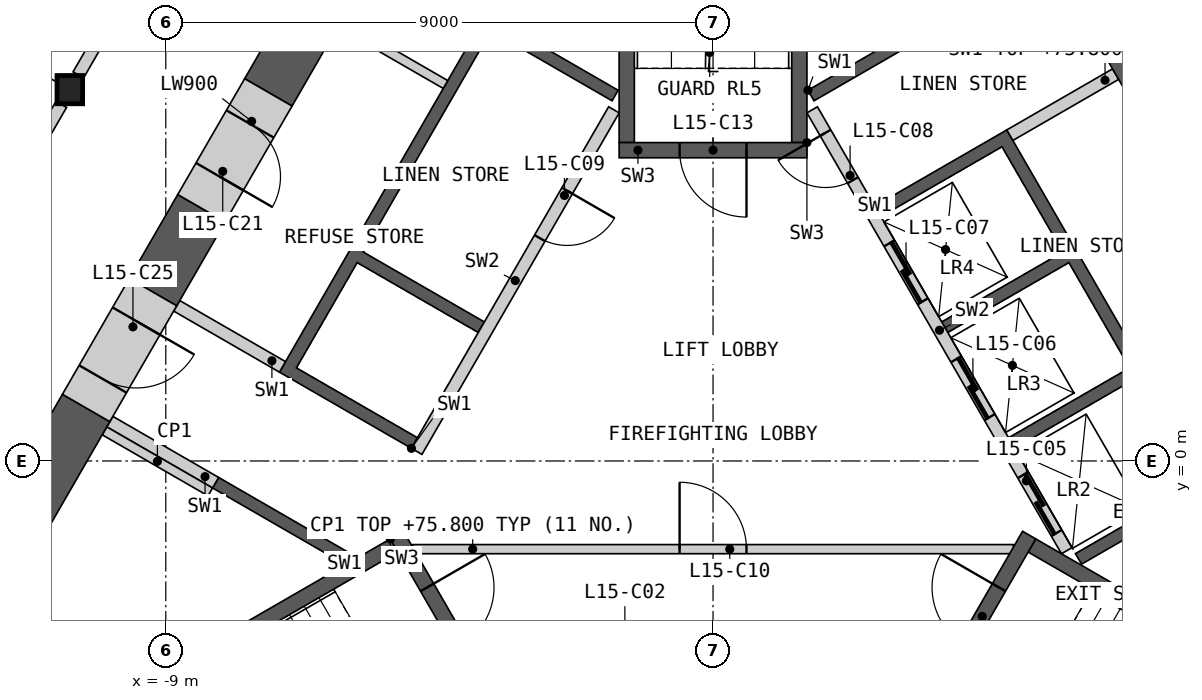
"""IFC4 building model, lengths in metres.
Left out: names, types, materials, properties, quantities, classifications, styles, units other than length and angle.
Written with IfcOpenShell. Run it as: python <this file> out.ifc"""

import sys

from ifc_helpers import new_model, si_unit, direction, frame, frame_2d, origin, origin_2d, place, context, subcontext, project, spatial, polyline, rectangle, i_section, outline, extrude, element, fill, save


model = new_model("IFC4")
c1 = context("Model", 3, precision=1e-05, world=origin(), true_north=direction((0.0, 1.0)))
c2 = subcontext(c1, "Body", "Model", "MODEL_VIEW")
j1 = project(units=[si_unit("LENGTHUNIT", "METRE"), si_unit("PLANEANGLEUNIT", "RADIAN")], contexts=[c1])
p1 = place(None, origin())
s1 = spatial("IfcSite", under=j1, at=p1, CompositionType="ELEMENT")
p2 = place(p1, origin())
s2 = spatial("IfcBuilding", under=s1, at=p2, CompositionType="ELEMENT")
p3 = place(p2, frame((0.0, 0.0, 72.0)))
s3 = spatial("IfcBuildingStorey", under=s2, at=p3, CompositionType="ELEMENT", Elevation=72.0)
p4 = place(p3, frame((-10.578, 6.107, 0.0), z_axis=(0.0, 0.0, 1.0), x_axis=(1.0, 0.0, 0.0)))
e1 = element("IfcColumn", 1, at=p4, inside=s3, PredefinedType="COLUMN", context=c2, shape_type="SweptSolid", body=[
    extrude(i_section(OverallWidth=0.421, OverallDepth=0.465, WebThickness=0.045, FlangeThickness=0.072, at=origin_2d()), origin(), (0.0, 0.0, 1.0), 4.2),
])
p5 = place(p3, origin())
e2 = element("IfcWall", 2, at=p5, inside=s3, PredefinedType="SHEAR", context=c2, shape_type="SweptSolid", body=[
    extrude(outline(polyline([(1.561, 6.097), (3.731, 7.35), (3.831, 7.177), (1.66, 5.924), (1.561, 6.097)])), origin(), (0.0, 0.0, 1.0), 3.8),
])
p6 = place(p3, origin())
e3 = element("IfcWall", 3, at=p6, inside=s3, PredefinedType="SHEAR", context=c2, shape_type="SweptSolid", body=[
    extrude(outline(polyline([(2.66, 4.192), (4.831, 5.445), (8.231, -0.444), (6.061, -1.697), (5.96, -1.524), (7.952, -0.374), (6.952, 1.358), (4.96, 0.208), (4.861, 0.381), (6.852, 1.531), (5.852, 3.263), (3.861, 2.113), (3.76, 2.287), (5.752, 3.437), (4.752, 5.169), (2.76, 4.019), (2.66, 4.192)])), origin(), (0.0, 0.0, 1.0), 3.8),
])
p7 = place(p3, frame((5.817, -1.476, 0.0), z_axis=(0.0, 0.0, 1.0), x_axis=(-0.500002616675, 0.866023893041, 0.0)))
e4 = element("IfcWall", 4, at=p7, inside=s3, PredefinedType="SOLIDWALL", context=c2, shape_type="SweptSolid", body=[
    extrude(rectangle(XDim=8.373, YDim=0.2, at=frame_2d((4.187, 0.0))), origin(), (0.0, 0.0, 1.0), 3.8),
])
p8 = place(p7, frame((0.337, 0.0, 0.0)))
e5 = element("IfcOpeningElement", 5, at=p8, cuts=e4, PredefinedType="OPENING", context=c2, shape_type="SweptSolid", body=[
    extrude(rectangle(XDim=1.1, YDim=2.1, at=frame_2d((0.55, 1.05))), frame((0.0, 0.11, 0.0), z_axis=(0.0, -1.0, 0.0), x_axis=(1.0, 0.0, 0.0)), (0.0, 0.0, 1.0), 0.22),
])
p9 = place(p7, frame((2.537, 0.0, 0.0)))
e6 = element("IfcOpeningElement", 6, at=p9, cuts=e4, PredefinedType="OPENING", context=c2, shape_type="SweptSolid", body=[
    extrude(rectangle(XDim=1.1, YDim=2.1, at=frame_2d((0.55, 1.05))), frame((0.0, 0.11, 0.0), z_axis=(0.0, -1.0, 0.0), x_axis=(1.0, 0.0, 0.0)), (0.0, 0.0, 1.0), 0.22),
])
p10 = place(p7, frame((4.737, 0.0, 0.0)))
e7 = element("IfcOpeningElement", 7, at=p10, cuts=e4, PredefinedType="OPENING", context=c2, shape_type="SweptSolid", body=[
    extrude(rectangle(XDim=1.1, YDim=2.1, at=frame_2d((0.55, 1.05))), frame((0.0, 0.11, 0.0), z_axis=(0.0, -1.0, 0.0), x_axis=(1.0, 0.0, 0.0)), (0.0, 0.0, 1.0), 0.22),
])
p11 = place(p7, frame((7.037, 0.0, 0.0)))
e8 = element("IfcOpeningElement", 8, at=p11, cuts=e4, PredefinedType="OPENING", context=c2, shape_type="SweptSolid", body=[
    extrude(rectangle(XDim=0.9, YDim=2.1, at=frame_2d((0.45, 1.05))), frame((0.0, 0.11, 0.0), z_axis=(0.0, -1.0, 0.0), x_axis=(1.0, 0.0, 0.0)), (0.0, 0.0, 1.0), 0.22),
])
p12 = place(p3, frame((4.881, 5.358, 0.0), z_axis=(0.0, 0.0, 1.0), x_axis=(0.866035824272, 0.499981950752, 0.0)))
e9 = element("IfcWall", 9, at=p12, inside=s3, PredefinedType="SHEAR", context=c2, shape_type="SweptSolid", body=[
    extrude(rectangle(XDim=2.009, YDim=0.2, at=frame_2d((1.004, 0.0))), origin(), (0.0, 0.0, 1.0), 3.8),
])
p13 = place(p3, origin())
e10 = element("IfcWall", 10, at=p13, inside=s3, PredefinedType="SHEAR", context=c2, shape_type="SweptSolid", body=[
    extrude(outline(polyline([(-6.061, -1.697), (-8.231, -0.444), (-8.131, -0.271), (-5.96, -1.524), (-6.061, -1.697)])), origin(), (0.0, 0.0, 1.0), 3.8),
])
p14 = place(p3, origin())
e11 = element("IfcWall", 11, at=p14, inside=s3, PredefinedType="SHEAR", context=c2, shape_type="SweptSolid", body=[
    extrude(outline(polyline([(-4.96, 0.208), (-7.131, 1.461), (-3.731, 7.35), (-1.561, 6.097), (-1.66, 5.924), (-3.652, 7.074), (-5.752, 3.437), (-3.76, 2.287), (-3.861, 2.113), (-5.852, 3.263), (-6.852, 1.531), (-4.861, 0.381), (-4.96, 0.208)])), origin(), (0.0, 0.0, 1.0), 3.8),
])
p15 = place(p3, frame((-1.631, 5.776, 0.0), z_axis=(0.0, 0.0, 1.0), x_axis=(-0.499992876559, -0.866029516466, 0.0)))
e12 = element("IfcWall", 12, at=p15, inside=s3, PredefinedType="SOLIDWALL", context=c2, shape_type="SweptSolid", body=[
    extrude(rectangle(XDim=6.486, YDim=0.2, at=frame_2d((3.243, 0.0))), origin(), (0.0, 0.0, 1.0), 3.8),
])
p16 = place(p15, frame((1.537, 0.0, 0.0)))
e13 = element("IfcOpeningElement", 13, at=p16, cuts=e12, PredefinedType="OPENING", context=c2, shape_type="SweptSolid", body=[
    extrude(rectangle(XDim=0.9, YDim=2.1, at=frame_2d((0.45, 1.05))), frame((0.0, 0.11, 0.0), z_axis=(0.0, -1.0, 0.0), x_axis=(1.0, 0.0, 0.0)), (0.0, 0.0, 1.0), 0.22),
])
p17 = place(p3, frame((-7.081, 1.548, 0.0), z_axis=(0.0, 0.0, 1.0), x_axis=(-0.865983199114, 0.50007309351, 0.0)))
e14 = element("IfcWall", 14, at=p17, inside=s3, PredefinedType="SHEAR", context=c2, shape_type="SweptSolid", body=[
    extrude(rectangle(XDim=2.009, YDim=0.2, at=frame_2d((1.004, 0.0))), origin(), (0.0, 0.0, 1.0), 3.8),
])
p18 = place(p3, frame((-8.181, -0.357, 0.0), z_axis=(0.0, 0.0, 1.0), x_axis=(-0.866035824272, 0.499981950752, 0.0)))
e15 = element("IfcWall", 15, at=p18, inside=s3, PredefinedType="SHEAR", context=c2, shape_type="SweptSolid", body=[
    extrude(rectangle(XDim=2.009, YDim=0.2, at=frame_2d((1.004, 0.0))), origin(), (0.0, 0.0, 1.0), 3.8),
])
p19 = place(p3, frame((-4.941, -1.45, 0.0), z_axis=(0.0, 0.0, 1.0), x_axis=(1.0, 0.0, 0.0)))
e16 = element("IfcWall", 16, at=p19, inside=s3, PredefinedType="PARTITIONING", context=c2, shape_type="SweptSolid", body=[
    extrude(rectangle(XDim=9.882, YDim=0.15, at=frame_2d((4.941, 0.0))), origin(), (0.0, 0.0, 1.0), 3.8),
])
p20 = place(p19, frame((4.391, 0.0, 0.0)))
e17 = element("IfcOpeningElement", 17, at=p20, cuts=e16, PredefinedType="OPENING", context=c2, shape_type="SweptSolid", body=[
    extrude(rectangle(XDim=1.1, YDim=2.1, at=frame_2d((0.55, 1.05))), frame((0.0, 0.085, 0.0), z_axis=(0.0, -1.0, 0.0), x_axis=(1.0, 0.0, 0.0)), (0.0, 0.0, 1.0), 0.17),
])
p21 = place(p3, origin())
e18 = element("IfcWall", 18, at=p21, inside=s3, PredefinedType="SHEAR", context=c2, shape_type="SweptSolid", body=[
    extrude(outline(polyline([(-5.307, -1.281), (-10.374, -4.206), (-10.032, -4.298), (-5.182, -1.498), (-5.307, -1.281)])), origin(), (0.0, 0.0, 1.0), 3.8),
])
p22 = place(p3, frame((-5.199, -1.219, 0.0), z_axis=(0.0, 0.0, 1.0), x_axis=(0.499982516597, -0.866035497597, 0.0)))
e19 = element("IfcWall", 19, at=p22, inside=s3, PredefinedType="SHEAR", context=c2, shape_type="SweptSolid", body=[
    extrude(rectangle(XDim=3.088, YDim=0.25, at=frame_2d((1.544, 0.0))), origin(), (0.0, 0.0, 1.0), 3.8),
])
p23 = place(p22, frame((0.994, 0.0, 0.0)))
e20 = element("IfcOpeningElement", 20, at=p23, cuts=e19, PredefinedType="OPENING", context=c2, shape_type="SweptSolid", body=[
    extrude(rectangle(XDim=1.1, YDim=2.1, at=frame_2d((0.55, 1.05))), frame((0.0, 0.135, 0.0), z_axis=(0.0, -1.0, 0.0), x_axis=(1.0, 0.0, 0.0)), (0.0, 0.0, 1.0), 0.27),
])
p24 = place(p3, origin())
e21 = element("IfcWall", 21, at=p24, inside=s3, PredefinedType="SHEAR", context=c2, shape_type="SweptSolid", body=[
    extrude(outline(polyline([(10.032, -4.298), (10.374, -4.206), (5.307, -1.281), (5.182, -1.498), (10.032, -4.298)])), origin(), (0.0, 0.0, 1.0), 3.8),
])
p25 = place(p3, frame((3.655, -3.893, 0.0), z_axis=(0.0, 0.0, 1.0), x_axis=(0.499982516597, 0.866035497597, 0.0)))
e22 = element("IfcWall", 22, at=p25, inside=s3, PredefinedType="SHEAR", context=c2, shape_type="SweptSolid", body=[
    extrude(rectangle(XDim=3.088, YDim=0.25, at=frame_2d((1.544, 0.0))), origin(), (0.0, 0.0, 1.0), 3.8),
])
p26 = place(p25, frame((0.994, 0.0, 0.0)))
e23 = element("IfcOpeningElement", 23, at=p26, cuts=e22, PredefinedType="OPENING", context=c2, shape_type="SweptSolid", body=[
    extrude(rectangle(XDim=1.1, YDim=2.1, at=frame_2d((0.55, 1.05))), frame((0.0, 0.135, 0.0), z_axis=(0.0, -1.0, 0.0), x_axis=(1.0, 0.0, 0.0)), (0.0, 0.0, 1.0), 0.27),
])
p27 = place(p3, origin())
e24 = element("IfcWall", 24, at=p27, inside=s3, PredefinedType="SHEAR", context=c2, shape_type="SweptSolid", body=[
    extrude(outline(polyline([(1.544, 5.237), (1.544, 11.087), (1.294, 10.837), (1.294, 5.237), (1.544, 5.237)])), origin(), (0.0, 0.0, 1.0), 3.8),
])
p28 = place(p3, origin())
e25 = element("IfcWall", 25, at=p28, inside=s3, PredefinedType="SHEAR", context=c2, shape_type="SweptSolid", body=[
    extrude(outline(polyline([(-1.294, 10.837), (-1.544, 11.087), (-1.544, 5.237), (-1.294, 5.237), (-1.294, 10.837)])), origin(), (0.0, 0.0, 1.0), 3.8),
])
p29 = place(p3, frame((1.544, 5.112, 0.0), z_axis=(0.0, 0.0, 1.0), x_axis=(-1.0, 0.0, 0.0)))
e26 = element("IfcWall", 26, at=p29, inside=s3, PredefinedType="SHEAR", context=c2, shape_type="SweptSolid", body=[
    extrude(rectangle(XDim=3.088, YDim=0.25, at=frame_2d((1.544, 0.0))), origin(), (0.0, 0.0, 1.0), 3.8),
])
p30 = place(p29, frame((0.994, 0.0, 0.0)))
e27 = element("IfcOpeningElement", 27, at=p30, cuts=e26, PredefinedType="OPENING", context=c2, shape_type="SweptSolid", body=[
    extrude(rectangle(XDim=1.1, YDim=2.1, at=frame_2d((0.55, 1.05))), frame((0.0, 0.135, 0.0), z_axis=(0.0, -1.0, 0.0), x_axis=(1.0, 0.0, 0.0)), (0.0, 0.0, 1.0), 0.27),
])
for number, where, z_axis, x_axis in (
    (28, (-8.268, -0.509, 0.0), (0.0, 0.0, 1.0), (-0.866, 0.5, 0.0)),
    (29, (-6.139, 7.196, 0.0), (0.0, 0.0, 1.0), (0.866, -0.5, 0.0)),
):
    element("IfcWall", number, at=place(p3, frame(where, z_axis=z_axis, x_axis=x_axis)), inside=s3, PredefinedType="PARTITIONING", context=c2, shape_type="SweptSolid", body=[
        extrude(rectangle(XDim=2.009, YDim=0.15, at=frame_2d((1.004, 0.0))), origin(), (0.0, 0.0, 1.0), 3.8),
    ])
p31 = place(p3, frame((7.807, 5.208, 0.0), z_axis=(0.0, 0.0, 1.0), x_axis=(-0.499986664161, 0.866033103098, 0.0)))
e30 = element("IfcWall", 30, at=p31, inside=s3, PredefinedType="SHEAR", context=c2, shape_type="SweptSolid", body=[
    extrude(rectangle(XDim=6.586, YDim=0.9, at=frame_2d((3.293, 0.0))), origin(), (0.0, 0.0, 1.0), 3.8),
])
p32 = place(p3, frame((-10.31, 0.872, 0.0), z_axis=(0.0, 0.0, 1.0), x_axis=(-0.499946751862, -0.866056144429, 0.0)))
e31 = element("IfcWall", 31, at=p32, inside=s3, PredefinedType="SHEAR", context=c2, shape_type="SweptSolid", body=[
    extrude(rectangle(XDim=2.889, YDim=0.9, at=frame_2d((1.445, 0.0))), origin(), (0.0, 0.0, 1.0), 3.8),
])
p33 = place(p3, frame((-6.145, 8.086, 0.0), z_axis=(0.0, 0.0, 1.0), x_axis=(-0.500026924946, -0.866009858102, 0.0)))
e32 = element("IfcWall", 32, at=p33, inside=s3, PredefinedType="SHEAR", context=c2, shape_type="SweptSolid", body=[
    extrude(rectangle(XDim=2.337, YDim=0.9, at=frame_2d((1.168, 0.0))), origin(), (0.0, 0.0, 1.0), 3.8),
])
p34 = place(p3, frame((-8.413, 4.157, 0.0), z_axis=(0.0, 0.0, 1.0), x_axis=(-0.499961121316, -0.86604784924, 0.0)))
e33 = element("IfcWall", 33, at=p34, inside=s3, PredefinedType="SHEAR", context=c2, shape_type="SweptSolid", body=[
    extrude(rectangle(XDim=1.594, YDim=0.9, at=frame_2d((0.797, 0.0))), origin(), (0.0, 0.0, 1.0), 3.8),
])
p35 = place(p3, frame((-7.313, 6.062, 0.0), z_axis=(0.0, 0.0, 1.0), x_axis=(-0.500077893725, -0.86598042715, 0.0)))
e34 = element("IfcWall", 34, at=p35, inside=s3, PredefinedType="SHEAR", context=c2, shape_type="SweptSolid", body=[
    extrude(rectangle(XDim=2.2, YDim=0.9, at=frame_2d((1.1, 0.0))), origin(), (0.0, 0.0, 1.0), 3.8),
])
p36 = place(p35, frame((0.6, 0.0, 0.0)))
e35 = element("IfcOpeningElement", 35, at=p36, cuts=e34, PredefinedType="OPENING", context=c2, shape_type="SweptSolid", body=[
    extrude(rectangle(XDim=1.0, YDim=2.1, at=frame_2d((0.5, 1.05))), frame((0.0, 0.46, 0.0), z_axis=(0.0, -1.0, 0.0), x_axis=(1.0, 0.0, 0.0)), (0.0, 0.0, 1.0), 0.92),
])
p37 = place(p3, frame((-9.21, 2.777, 0.0), z_axis=(0.0, 0.0, 1.0), x_axis=(-0.500077893725, -0.86598042715, 0.0)))
e36 = element("IfcWall", 36, at=p37, inside=s3, PredefinedType="SHEAR", context=c2, shape_type="SweptSolid", body=[
    extrude(rectangle(XDim=2.2, YDim=0.9, at=frame_2d((1.1, 0.0))), origin(), (0.0, 0.0, 1.0), 3.8),
])
p38 = place(p37, frame((0.55, 0.0, 0.0)))
e37 = element("IfcOpeningElement", 37, at=p38, cuts=e36, PredefinedType="OPENING", context=c2, shape_type="SweptSolid", body=[
    extrude(rectangle(XDim=1.1, YDim=2.1, at=frame_2d((0.55, 1.05))), frame((0.0, 0.46, 0.0), z_axis=(0.0, -1.0, 0.0), x_axis=(1.0, 0.0, 0.0)), (0.0, 0.0, 1.0), 0.92),
])
p39 = place(p3, frame((-15.728, -2.811, 0.0), z_axis=(0.0, 0.0, 1.0), x_axis=(0.49999175339, 0.866030164915, 0.0)))
e38 = element("IfcWall", 38, at=p39, inside=s3, PredefinedType="PARTITIONING", context=c2, shape_type="SweptSolid", body=[
    extrude(rectangle(XDim=10.019, YDim=0.2, at=frame_2d((5.009, 0.0))), origin(), (0.0, 0.0, 1.0), 3.8),
])
p40 = place(p39, frame((2.154, 0.0, 0.0)))
e39 = element("IfcOpeningElement", 39, at=p40, cuts=e38, PredefinedType="OPENING", context=c2, shape_type="SweptSolid", body=[
    extrude(rectangle(XDim=1.0, YDim=2.1, at=frame_2d((0.5, 1.05))), frame((0.0, 0.11, 0.0), z_axis=(0.0, -1.0, 0.0), x_axis=(1.0, 0.0, 0.0)), (0.0, 0.0, 1.0), 0.22),
])
p41 = place(p3, frame((-10.439, 6.35, 0.0), z_axis=(0.0, 0.0, 1.0), x_axis=(0.50001002959, 0.86601961312, 0.0)))
e40 = element("IfcWall", 40, at=p41, inside=s3, PredefinedType="PARTITIONING", context=c2, shape_type="SweptSolid", body=[
    extrude(rectangle(XDim=10.019, YDim=0.2, at=frame_2d((5.009, 0.0))), origin(), (0.0, 0.0, 1.0), 3.8),
])
p42 = place(p41, frame((6.865, 0.0, 0.0)))
e41 = element("IfcOpeningElement", 41, at=p42, cuts=e40, PredefinedType="OPENING", context=c2, shape_type="SweptSolid", body=[
    extrude(rectangle(XDim=1.0, YDim=2.1, at=frame_2d((0.5, 1.05))), frame((0.0, 0.11, 0.0), z_axis=(0.0, -1.0, 0.0), x_axis=(1.0, 0.0, 0.0)), (0.0, 0.0, 1.0), 0.22),
])
p43 = place(p41, frame((1.854, 0.0, 0.0)))
e42 = element("IfcOpeningElement", 42, at=p43, cuts=e40, PredefinedType="OPENING", context=c2, shape_type="SweptSolid", body=[
    extrude(rectangle(XDim=1.0, YDim=2.1, at=frame_2d((0.5, 1.05))), frame((0.0, 0.11, 0.0), z_axis=(0.0, -1.0, 0.0), x_axis=(1.0, 0.0, 0.0)), (0.0, 0.0, 1.0), 0.22),
])
p44 = place(p3, frame((5.429, 15.026, 0.0), z_axis=(0.0, 0.0, 1.0), x_axis=(0.50001002959, -0.86601961312, 0.0)))
e43 = element("IfcWall", 43, at=p44, inside=s3, PredefinedType="PARTITIONING", context=c2, shape_type="SweptSolid", body=[
    extrude(rectangle(XDim=10.019, YDim=0.2, at=frame_2d((5.009, 0.0))), origin(), (0.0, 0.0, 1.0), 3.8),
])
p45 = place(p44, frame((7.165, 0.0, 0.0)))
e44 = element("IfcOpeningElement", 44, at=p45, cuts=e43, PredefinedType="OPENING", context=c2, shape_type="SweptSolid", body=[
    extrude(rectangle(XDim=1.0, YDim=2.1, at=frame_2d((0.5, 1.05))), frame((0.0, 0.11, 0.0), z_axis=(0.0, -1.0, 0.0), x_axis=(1.0, 0.0, 0.0)), (0.0, 0.0, 1.0), 0.22),
])
p46 = place(p8, origin())
e45 = element("IfcDoor", 45, at=p46, inside=s3, OperationType="SLIDING_TO_LEFT", PredefinedType="DOOR", context=c2, shape_type="SweptSolid", body=[
    extrude(rectangle(XDim=1.1, YDim=2.1, at=frame_2d((0.55, 1.05))), frame((0.0, 0.025, 0.0), z_axis=(0.0, -1.0, 0.0), x_axis=(1.0, 0.0, 0.0)), (0.0, 0.0, 1.0), 0.05),
])
fill(e5, e45)
p47 = place(p9, origin())
e46 = element("IfcDoor", 46, at=p47, inside=s3, OperationType="SLIDING_TO_LEFT", PredefinedType="DOOR", context=c2, shape_type="SweptSolid", body=[
    extrude(rectangle(XDim=1.1, YDim=2.1, at=frame_2d((0.55, 1.05))), frame((0.0, 0.025, 0.0), z_axis=(0.0, -1.0, 0.0), x_axis=(1.0, 0.0, 0.0)), (0.0, 0.0, 1.0), 0.05),
])
fill(e6, e46)
p48 = place(p10, origin())
e47 = element("IfcDoor", 47, at=p48, inside=s3, OperationType="SLIDING_TO_LEFT", PredefinedType="DOOR", context=c2, shape_type="SweptSolid", body=[
    extrude(rectangle(XDim=1.1, YDim=2.1, at=frame_2d((0.55, 1.05))), frame((0.0, 0.025, 0.0), z_axis=(0.0, -1.0, 0.0), x_axis=(1.0, 0.0, 0.0)), (0.0, 0.0, 1.0), 0.05),
])
fill(e7, e47)
p49 = place(p11, origin())
e48 = element("IfcDoor", 48, at=p49, inside=s3, OperationType="SINGLE_SWING_RIGHT", PredefinedType="DOOR", context=c2, shape_type="SweptSolid", body=[
    extrude(rectangle(XDim=0.9, YDim=2.1, at=frame_2d((0.45, 1.05))), frame((0.0, 0.025, 0.0), z_axis=(0.0, -1.0, 0.0), x_axis=(1.0, 0.0, 0.0)), (0.0, 0.0, 1.0), 0.05),
])
fill(e8, e48)
p50 = place(p16, origin())
e49 = element("IfcDoor", 49, at=p50, inside=s3, OperationType="SINGLE_SWING_LEFT", PredefinedType="DOOR", context=c2, shape_type="SweptSolid", body=[
    extrude(rectangle(XDim=0.9, YDim=2.1, at=frame_2d((0.45, 1.05))), frame((0.0, 0.025, 0.0), z_axis=(0.0, -1.0, 0.0), x_axis=(1.0, 0.0, 0.0)), (0.0, 0.0, 1.0), 0.05),
])
fill(e13, e49)
p51 = place(p20, origin())
e50 = element("IfcDoor", 50, at=p51, inside=s3, OperationType="SINGLE_SWING_LEFT", PredefinedType="DOOR", context=c2, shape_type="SweptSolid", body=[
    extrude(rectangle(XDim=1.1, YDim=2.1, at=frame_2d((0.55, 1.05))), frame((0.0, 0.025, 0.0), z_axis=(0.0, -1.0, 0.0), x_axis=(1.0, 0.0, 0.0)), (0.0, 0.0, 1.0), 0.05),
])
fill(e17, e50)
p52 = place(p23, origin())
e51 = element("IfcDoor", 51, at=p52, inside=s3, OperationType="SINGLE_SWING_LEFT", PredefinedType="DOOR", context=c2, shape_type="SweptSolid", body=[
    extrude(rectangle(XDim=1.1, YDim=2.1, at=frame_2d((0.55, 1.05))), frame((0.0, 0.025, 0.0), z_axis=(0.0, -1.0, 0.0), x_axis=(1.0, 0.0, 0.0)), (0.0, 0.0, 1.0), 0.05),
])
fill(e20, e51)
p53 = place(p26, origin())
e52 = element("IfcDoor", 52, at=p53, inside=s3, OperationType="SINGLE_SWING_RIGHT", PredefinedType="DOOR", context=c2, shape_type="SweptSolid", body=[
    extrude(rectangle(XDim=1.1, YDim=2.1, at=frame_2d((0.55, 1.05))), frame((0.0, 0.025, 0.0), z_axis=(0.0, -1.0, 0.0), x_axis=(1.0, 0.0, 0.0)), (0.0, 0.0, 1.0), 0.05),
])
fill(e23, e52)
p54 = place(p30, origin())
e53 = element("IfcDoor", 53, at=p54, inside=s3, OperationType="SINGLE_SWING_LEFT", PredefinedType="DOOR", context=c2, shape_type="SweptSolid", body=[
    extrude(rectangle(XDim=1.1, YDim=2.1, at=frame_2d((0.55, 1.05))), frame((0.0, 0.025, 0.0), z_axis=(0.0, -1.0, 0.0), x_axis=(1.0, 0.0, 0.0)), (0.0, 0.0, 1.0), 0.05),
])
fill(e27, e53)
p55 = place(p36, origin())
e54 = element("IfcDoor", 54, at=p55, inside=s3, OperationType="SINGLE_SWING_RIGHT", PredefinedType="DOOR", context=c2, shape_type="SweptSolid", body=[
    extrude(rectangle(XDim=1.0, YDim=2.1, at=frame_2d((0.5, 1.05))), frame((0.0, 0.205, 0.0), z_axis=(0.0, -1.0, 0.0), x_axis=(1.0, 0.0, 0.0)), (0.0, 0.0, 1.0), 0.05),
])
fill(e35, e54)
p56 = place(p38, origin())
e55 = element("IfcDoor", 55, at=p56, inside=s3, OperationType="SINGLE_SWING_LEFT", PredefinedType="DOOR", context=c2, shape_type="SweptSolid", body=[
    extrude(rectangle(XDim=1.1, YDim=2.1, at=frame_2d((0.55, 1.05))), frame((0.0, 0.205, 0.0), z_axis=(0.0, -1.0, 0.0), x_axis=(1.0, 0.0, 0.0)), (0.0, 0.0, 1.0), 0.05),
])
fill(e37, e55)
save(model, sys.argv[1])
